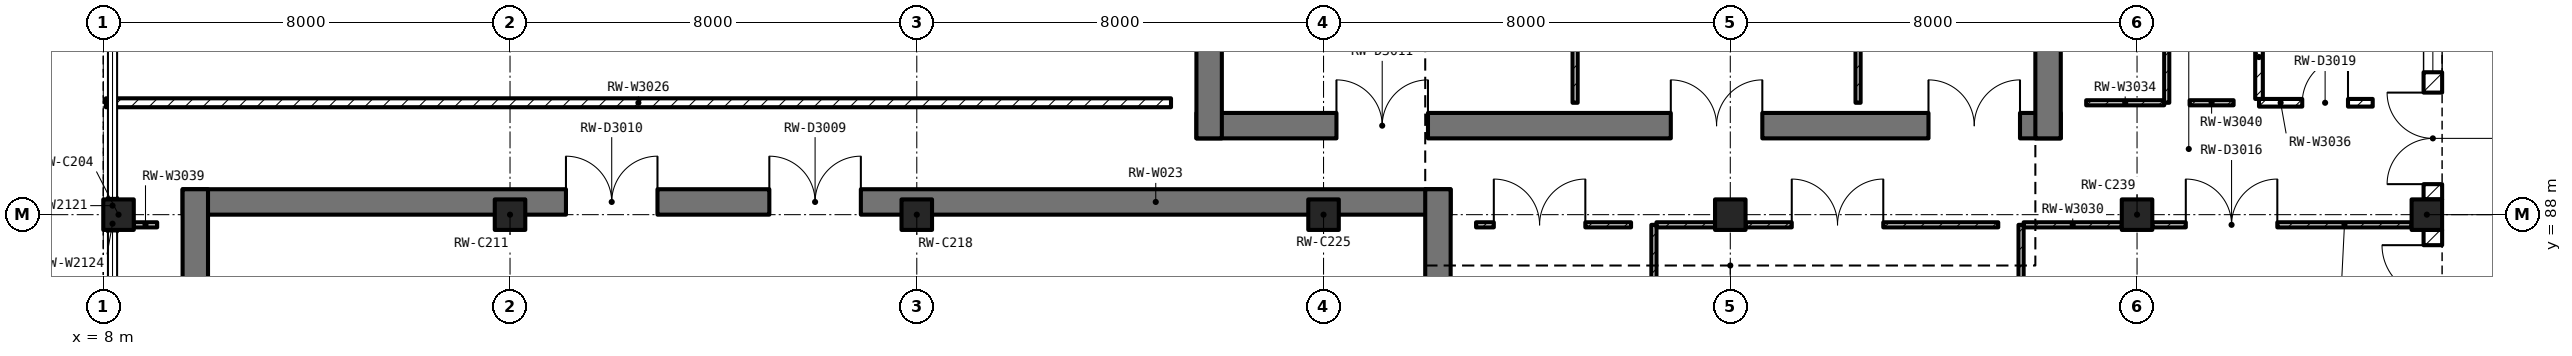
"""IFC4 building model, lengths in metres.
Left out: names, types, materials, properties, quantities, classifications, styles, units other than length and angle.
Written with IfcOpenShell. Run it as: python <this file> out.ifc"""

import sys

from ifc_helpers import new_model, si_unit, direction, frame, frame_2d, origin, origin_2d, place, context, subcontext, project, spatial, rectangle, extrude, element, fill, save


model = new_model("IFC4")
c1 = context("Model", 3, precision=1e-05, world=origin(), true_north=direction((0.0, 1.0)))
c2 = subcontext(c1, "Body", "Model", "MODEL_VIEW")
j1 = project(units=[si_unit("LENGTHUNIT", "METRE"), si_unit("PLANEANGLEUNIT", "RADIAN")], contexts=[c1])
p1 = place(None, origin())
s1 = spatial("IfcSite", under=j1, at=p1, CompositionType="ELEMENT")
p2 = place(p1, origin())
s2 = spatial("IfcBuilding", under=s1, at=p2, CompositionType="ELEMENT")
p3 = place(p2, origin())
s3 = spatial("IfcBuildingStorey", under=s2, at=p3, CompositionType="ELEMENT", Elevation=0.0)
for number, where, z_axis, x_axis in (
    (1, (8.3, 88.0, 0.0), (0.0, 0.0, 1.0), (1.0, 0.0, 0.0)),
    (2, (16.0, 88.0, 0.0), (0.0, 0.0, 1.0), (1.0, 0.0, 0.0)),
    (3, (24.0, 88.0, 0.0), (0.0, 0.0, 1.0), (1.0, 0.0, 0.0)),
    (4, (32.0, 88.0, 0.0), (0.0, 0.0, 1.0), (1.0, 0.0, 0.0)),
    (5, (40.0, 88.0, 0.0), (0.0, 0.0, 1.0), (1.0, 0.0, 0.0)),
    (6, (48.0, 88.0, 0.0), (0.0, 0.0, 1.0), (1.0, 0.0, 0.0)),
    (7, (53.7, 88.0, 0.0), (0.0, 0.0, 1.0), (1.0, 0.0, 0.0)),
):
    element("IfcColumn", number, at=place(p3, frame(where, z_axis=z_axis, x_axis=x_axis)), inside=s3, PredefinedType="COLUMN", context=c2, shape_type="SweptSolid", body=[
        extrude(rectangle(XDim=0.6, YDim=0.6, at=origin_2d()), origin(), (0.0, 0.0, 1.0), 6.0),
    ])
p4 = place(p3, frame((29.5, 89.75, 0.0), z_axis=(0.0, 0.0, 1.0), x_axis=(1.0, 0.0, 0.0)))
e8 = element("IfcWall", 8, at=p4, inside=s3, PredefinedType="SHEAR", context=c2, shape_type="SweptSolid", body=[
    extrude(rectangle(XDim=17.0, YDim=0.5, at=frame_2d((8.5, 0.0))), origin(), (0.0, 0.0, 1.0), 6.0),
])
p5 = place(p4, frame((2.754, 0.0, 0.0)))
e9 = element("IfcOpeningElement", 9, at=p5, cuts=e8, PredefinedType="OPENING", context=c2, shape_type="SweptSolid", body=[
    extrude(rectangle(XDim=1.8, YDim=2.1, at=frame_2d((0.9, 1.05))), frame((0.0, 0.262, 0.0), z_axis=(0.0, -1.0, 0.0), x_axis=(1.0, 0.0, 0.0)), (0.0, 0.0, 1.0), 0.524),
])
p6 = place(p4, frame((9.33, 0.0, 0.0)))
e10 = element("IfcOpeningElement", 10, at=p6, cuts=e8, PredefinedType="OPENING", context=c2, shape_type="SweptSolid", body=[
    extrude(rectangle(XDim=1.8, YDim=2.1, at=frame_2d((0.9, 1.05))), frame((0.0, 0.262, 0.0), z_axis=(0.0, -1.0, 0.0), x_axis=(1.0, 0.0, 0.0)), (0.0, 0.0, 1.0), 0.524),
])
p7 = place(p4, frame((14.398, 0.0, 0.0)))
e11 = element("IfcOpeningElement", 11, at=p7, cuts=e8, PredefinedType="OPENING", context=c2, shape_type="SweptSolid", body=[
    extrude(rectangle(XDim=1.8, YDim=2.1, at=frame_2d((0.9, 1.05))), frame((0.0, 0.262, 0.0), z_axis=(0.0, -1.0, 0.0), x_axis=(1.0, 0.0, 0.0)), (0.0, 0.0, 1.0), 0.524),
])
for number, where, z_axis, x_axis in (
    (12, (29.75, 89.5, 0.0), (0.0, 0.0, 1.0), (0.0, 1.0, 0.0)),
    (13, (46.25, 89.5, 0.0), (0.0, 0.0, 1.0), (0.0, 1.0, 0.0)),
):
    element("IfcWall", number, at=place(p3, frame(where, z_axis=z_axis, x_axis=x_axis)), inside=s3, PredefinedType="SHEAR", context=c2, shape_type="SweptSolid", body=[
        extrude(rectangle(XDim=21.0, YDim=0.5, at=frame_2d((10.5, 0.0))), origin(), (0.0, 0.0, 1.0), 6.0),
    ])
p8 = place(p3, frame((9.56, 88.25, 0.0), z_axis=(0.0, 0.0, 1.0), x_axis=(1.0, 0.0, 0.0)))
e14 = element("IfcWall", 14, at=p8, inside=s3, PredefinedType="SHEAR", context=c2, shape_type="SweptSolid", body=[
    extrude(rectangle(XDim=24.94, YDim=0.5, at=frame_2d((12.47, 0.0))), origin(), (0.0, 0.0, 1.0), 6.0),
])
p9 = place(p8, frame((11.54, 0.0, 0.0)))
e15 = element("IfcOpeningElement", 15, at=p9, cuts=e14, PredefinedType="OPENING", context=c2, shape_type="SweptSolid", body=[
    extrude(rectangle(XDim=1.8, YDim=2.1, at=frame_2d((0.9, 1.05))), frame((0.0, 0.262, 0.0), z_axis=(0.0, -1.0, 0.0), x_axis=(1.0, 0.0, 0.0)), (0.0, 0.0, 1.0), 0.524),
])
p10 = place(p8, frame((7.54, 0.0, 0.0)))
e16 = element("IfcOpeningElement", 16, at=p10, cuts=e14, PredefinedType="OPENING", context=c2, shape_type="SweptSolid", body=[
    extrude(rectangle(XDim=1.8, YDim=2.1, at=frame_2d((0.9, 1.05))), frame((0.0, 0.262, 0.0), z_axis=(0.0, -1.0, 0.0), x_axis=(1.0, 0.0, 0.0)), (0.0, 0.0, 1.0), 0.524),
])
for number, where, z_axis, x_axis in (
    (17, (9.81, 65.5, 0.0), (0.0, 0.0, 1.0), (0.0, 1.0, 0.0)),
    (18, (34.25, 65.5, 0.0), (0.0, 0.0, 1.0), (0.0, 1.0, 0.0)),
):
    element("IfcWall", number, at=place(p3, frame(where, z_axis=z_axis, x_axis=x_axis)), inside=s3, PredefinedType="SHEAR", context=c2, shape_type="SweptSolid", body=[
        extrude(rectangle(XDim=23.0, YDim=0.5, at=frame_2d((11.5, 0.0))), origin(), (0.0, 0.0, 1.0), 6.0),
    ])
p11 = place(p3, frame((53.818, 80.243, 0.0), z_axis=(0.0, 0.0, 1.0), x_axis=(0.0, 1.0, 0.0)))
e19 = element("IfcWall", 19, at=p11, inside=s3, PredefinedType="SOLIDWALL", context=c2, shape_type="SweptSolid", body=[
    extrude(rectangle(XDim=7.457, YDim=0.365, at=frame_2d((3.729, 0.0))), origin(), (0.0, 0.0, 1.0), 5.05),
])
p12 = place(p11, frame((5.157, 0.0, 0.0)))
e20 = element("IfcOpeningElement", 20, at=p12, cuts=e19, PredefinedType="OPENING", context=c2, shape_type="SweptSolid", body=[
    extrude(rectangle(XDim=2.0, YDim=2.4, at=frame_2d((1.0, 1.2))), frame((0.0, 0.195, 0.0), z_axis=(0.0, -1.0, 0.0), x_axis=(1.0, 0.0, 0.0)), (0.0, 0.0, 1.0), 0.389),
])
p13 = place(p11, frame((1.357, 0.0, 0.0)))
e21 = element("IfcOpeningElement", 21, at=p13, cuts=e19, PredefinedType="OPENING", context=c2, shape_type="SweptSolid", body=[
    extrude(rectangle(XDim=1.8, YDim=2.4, at=frame_2d((0.9, 1.2))), frame((0.0, 0.195, 0.0), z_axis=(0.0, -1.0, 0.0), x_axis=(1.0, 0.0, 0.0)), (0.0, 0.0, 1.0), 0.389),
])
p14 = place(p3, frame((53.818, 88.3, 0.0), z_axis=(0.0, 0.0, 1.0), x_axis=(0.0, 1.0, 0.0)))
e22 = element("IfcWall", 22, at=p14, inside=s3, PredefinedType="SOLIDWALL", context=c2, shape_type="SweptSolid", body=[
    extrude(rectangle(XDim=7.4, YDim=0.365, at=frame_2d((3.7, 0.0))), origin(), (0.0, 0.0, 1.0), 5.05),
])
p15 = place(p14, frame((2.5, 0.0, 1.0)))
e23 = element("IfcOpeningElement", 23, at=p15, cuts=e22, PredefinedType="OPENING", context=c2, shape_type="SweptSolid", body=[
    extrude(rectangle(XDim=2.4, YDim=2.0, at=frame_2d((1.2, 1.0))), frame((0.0, 0.195, 0.0), z_axis=(0.0, -1.0, 0.0), x_axis=(1.0, 0.0, 0.0)), (0.0, 0.0, 1.0), 0.389),
])
p16 = place(p14, frame((0.3, 0.0, 0.0)))
e24 = element("IfcOpeningElement", 24, at=p16, cuts=e22, PredefinedType="OPENING", context=c2, shape_type="SweptSolid", body=[
    extrude(rectangle(XDim=1.8, YDim=2.4, at=frame_2d((0.9, 1.2))), frame((0.0, 0.195, 0.0), z_axis=(0.0, -1.0, 0.0), x_axis=(1.0, 0.0, 0.0)), (0.0, 0.0, 1.0), 0.389),
])
p17 = place(p3, frame((38.498, 87.8, 0.0), z_axis=(0.0, 0.0, 1.0), x_axis=(0.0, -1.0, 0.0)))
e25 = element("IfcWall", 25, at=p17, inside=s3, PredefinedType="PARTITIONING", context=c2, shape_type="SweptSolid", body=[
    extrude(rectangle(XDim=23.75, YDim=0.1, at=frame_2d((11.875, 0.0))), origin(), (0.0, 0.0, 1.0), 4.95),
])
for number, where, z_axis, x_axis in (
    (26, (36.948, 109.999, 0.0), (0.0, 0.0, 1.0), (0.0, -1.0, 0.0)),
    (27, (42.513, 109.999, 0.0), (0.0, 0.0, 1.0), (0.0, -1.0, 0.0)),
):
    element("IfcWall", number, at=place(p3, frame(where, z_axis=z_axis, x_axis=x_axis)), inside=s3, PredefinedType="PARTITIONING", context=c2, shape_type="SweptSolid", body=[
        extrude(rectangle(XDim=19.799, YDim=0.1, at=frame_2d((9.899, 0.0))), origin(), (0.0, 0.0, 1.0), 4.95),
    ])
p18 = place(p3, frame((48.584, 111.634, 0.0), z_axis=(0.0, 0.0, 1.0), x_axis=(0.0, -1.0, 0.0)))
e28 = element("IfcWall", 28, at=p18, inside=s3, PredefinedType="PARTITIONING", context=c2, shape_type="SweptSolid", body=[
    extrude(rectangle(XDim=21.434, YDim=0.1, at=frame_2d((10.717, 0.0))), origin(), (0.0, 0.0, 1.0), 4.95),
])
p19 = place(p18, frame((10.034, 0.0, 0.0)))
e29 = element("IfcOpeningElement", 29, at=p19, cuts=e28, PredefinedType="OPENING", context=c2, shape_type="SweptSolid", body=[
    extrude(rectangle(XDim=1.0, YDim=2.1, at=frame_2d((0.5, 1.05))), frame((0.0, 0.062, 0.0), z_axis=(0.0, -1.0, 0.0), x_axis=(1.0, 0.0, 0.0)), (0.0, 0.0, 1.0), 0.124),
])
p20 = place(p3, frame((29.0, 90.2, 0.0), z_axis=(0.0, 0.0, 1.0), x_axis=(-1.0, 0.0, 0.0)))
e30 = element("IfcWall", 30, at=p20, inside=s3, PredefinedType="PARTITIONING", context=c2, shape_type="SweptSolid", body=[
    extrude(rectangle(XDim=20.95, YDim=0.175, at=frame_2d((10.475, 0.0))), origin(), (0.0, 0.0, 1.0), 4.95),
])
p21 = place(p3, frame((45.719, 87.8, 0.0), z_axis=(0.0, 0.0, 1.0), x_axis=(0.0, -1.0, 0.0)))
e31 = element("IfcWall", 31, at=p21, inside=s3, PredefinedType="PARTITIONING", context=c2, shape_type="SweptSolid", body=[
    extrude(rectangle(XDim=9.399, YDim=0.1, at=frame_2d((4.7, 0.0))), origin(), (0.0, 0.0, 1.0), 4.95),
])
p22 = place(p3, frame((45.77, 87.8, 0.0), z_axis=(0.0, 0.0, 1.0), x_axis=(1.0, 0.0, 0.0)))
e32 = element("IfcWall", 32, at=p22, inside=s3, PredefinedType="PARTITIONING", context=c2, shape_type="SweptSolid", body=[
    extrude(rectangle(XDim=1.93, YDim=0.1, at=frame_2d((0.965, 0.0))), origin(), (0.0, 0.0, 1.0), 4.95),
])
p23 = place(p3, frame((48.3, 87.8, 0.0), z_axis=(0.0, 0.0, 1.0), x_axis=(1.0, 0.0, 0.0)))
e33 = element("IfcWall", 33, at=p23, inside=s3, PredefinedType="PARTITIONING", context=c2, shape_type="SweptSolid", body=[
    extrude(rectangle(XDim=5.1, YDim=0.1, at=frame_2d((2.55, 0.0))), origin(), (0.0, 0.0, 1.0), 4.95),
])
p24 = place(p23, frame((0.659, 0.0, 0.0)))
e34 = element("IfcOpeningElement", 34, at=p24, cuts=e33, PredefinedType="OPENING", context=c2, shape_type="SweptSolid", body=[
    extrude(rectangle(XDim=1.8, YDim=2.1, at=frame_2d((0.9, 1.05))), frame((0.0, 0.062, 0.0), z_axis=(0.0, -1.0, 0.0), x_axis=(1.0, 0.0, 0.0)), (0.0, 0.0, 1.0), 0.124),
])
p25 = place(p3, frame((38.548, 87.8, 0.0), z_axis=(0.0, 0.0, 1.0), x_axis=(1.0, 0.0, 0.0)))
e35 = element("IfcWall", 35, at=p25, inside=s3, PredefinedType="PARTITIONING", context=c2, shape_type="SweptSolid", body=[
    extrude(rectangle(XDim=1.152, YDim=0.1, at=frame_2d((0.576, 0.0))), origin(), (0.0, 0.0, 1.0), 4.95),
])
p26 = place(p3, frame((40.3, 87.8, 0.0), z_axis=(0.0, 0.0, 1.0), x_axis=(1.0, 0.0, 0.0)))
e36 = element("IfcWall", 36, at=p26, inside=s3, PredefinedType="PARTITIONING", context=c2, shape_type="SweptSolid", body=[
    extrude(rectangle(XDim=4.97, YDim=0.1, at=frame_2d((2.485, 0.0))), origin(), (0.0, 0.0, 1.0), 4.95),
])
p27 = place(p26, frame((0.909, 0.0, 0.0)))
e37 = element("IfcOpeningElement", 37, at=p27, cuts=e36, PredefinedType="OPENING", context=c2, shape_type="SweptSolid", body=[
    extrude(rectangle(XDim=1.8, YDim=2.1, at=frame_2d((0.9, 1.05))), frame((0.0, 0.062, 0.0), z_axis=(0.0, -1.0, 0.0), x_axis=(1.0, 0.0, 0.0)), (0.0, 0.0, 1.0), 0.124),
])
p28 = place(p3, frame((48.534, 90.2, 0.0), z_axis=(0.0, 0.0, 1.0), x_axis=(-1.0, 0.0, 0.0)))
e38 = element("IfcWall", 38, at=p28, inside=s3, PredefinedType="PARTITIONING", context=c2, shape_type="SweptSolid", body=[
    extrude(rectangle(XDim=1.534, YDim=0.1, at=frame_2d((0.767, 0.0))), origin(), (0.0, 0.0, 1.0), 4.95),
])
p29 = place(p3, frame((35.0, 87.8, 0.0), z_axis=(0.0, 0.0, 1.0), x_axis=(1.0, 0.0, 0.0)))
e39 = element("IfcWall", 39, at=p29, inside=s3, PredefinedType="PARTITIONING", context=c2, shape_type="SweptSolid", body=[
    extrude(rectangle(XDim=3.048, YDim=0.1, at=frame_2d((1.524, 0.0))), origin(), (0.0, 0.0, 1.0), 4.95),
])
p30 = place(p29, frame((0.349, 0.0, 0.0)))
e40 = element("IfcOpeningElement", 40, at=p30, cuts=e39, PredefinedType="OPENING", context=c2, shape_type="SweptSolid", body=[
    extrude(rectangle(XDim=1.8, YDim=2.1, at=frame_2d((0.9, 1.05))), frame((0.0, 0.062, 0.0), z_axis=(0.0, -1.0, 0.0), x_axis=(1.0, 0.0, 0.0)), (0.0, 0.0, 1.0), 0.124),
])
p31 = place(p3, frame((50.399, 90.2, 0.0), z_axis=(0.0, 0.0, 1.0), x_axis=(1.0, 0.0, 0.0)))
e41 = element("IfcWall", 41, at=p31, inside=s3, PredefinedType="PARTITIONING", context=c2, shape_type="SweptSolid", body=[
    extrude(rectangle(XDim=2.236, YDim=0.15, at=frame_2d((1.118, 0.0))), origin(), (0.0, 0.0, 1.0), 4.95),
])
p32 = place(p31, frame((0.85, 0.0, 0.0)))
e42 = element("IfcOpeningElement", 42, at=p32, cuts=e41, PredefinedType="OPENING", context=c2, shape_type="SweptSolid", body=[
    extrude(rectangle(XDim=0.9, YDim=2.1, at=frame_2d((0.45, 1.05))), frame((0.0, 0.087, 0.0), z_axis=(0.0, -1.0, 0.0), x_axis=(1.0, 0.0, 0.0)), (0.0, 0.0, 1.0), 0.174),
])
p33 = place(p3, frame((50.399, 90.276, 0.0), z_axis=(0.0, 0.0, 1.0), x_axis=(0.0, 1.0, 0.0)))
e43 = element("IfcWall", 43, at=p33, inside=s3, PredefinedType="PARTITIONING", context=c2, shape_type="SweptSolid", body=[
    extrude(rectangle(XDim=1.646, YDim=0.15, at=frame_2d((0.823, 0.0))), origin(), (0.0, 0.0, 1.0), 4.95),
])
p34 = place(p3, frame((8.601, 87.8, 0.0), z_axis=(0.0, 0.0, 1.0), x_axis=(1.0, 0.0, 0.0)))
e44 = element("IfcWall", 44, at=p34, inside=s3, PredefinedType="PARTITIONING", context=c2, shape_type="SweptSolid", body=[
    extrude(rectangle(XDim=0.459, YDim=0.1, at=frame_2d((0.229, 0.0))), origin(), (0.0, 0.0, 1.0), 4.95),
])
p35 = place(p3, frame((49.034, 90.2, 0.0), z_axis=(0.0, 0.0, 1.0), x_axis=(1.0, 0.0, 0.0)))
e45 = element("IfcWall", 45, at=p35, inside=s3, PredefinedType="PARTITIONING", context=c2, shape_type="SweptSolid", body=[
    extrude(rectangle(XDim=0.865, YDim=0.1, at=frame_2d((0.433, 0.0))), origin(), (0.0, 0.0, 1.0), 4.95),
])
for number, where, z_axis, x_axis in (
    (46, (8.182, 88.33, 0.0), (0.0, 0.0, 1.0), (0.0, -1.0, 0.0)),
    (47, (8.182, 87.67, 0.0), (0.0, 0.0, 1.0), (0.0, 1.0, 0.0)),
):
    element("IfcWall", number, at=place(p3, frame(where, z_axis=z_axis, x_axis=x_axis)), inside=s3, PredefinedType="SOLIDWALL", context=c2, shape_type="SweptSolid", body=[
        extrude(rectangle(XDim=0.305, YDim=0.18, at=frame_2d((0.153, 0.0))), origin(), (0.0, 0.0, 1.0), 4.2),
    ])
p36 = place(p15, origin())
e48 = element("IfcWindow", 48, at=p36, inside=s3, PartitioningType="DOUBLE_PANEL_VERTICAL", PredefinedType="WINDOW", context=c2, shape_type="SweptSolid", body=[
    extrude(rectangle(XDim=2.4, YDim=2.0, at=frame_2d((1.2, 1.0))), frame((0.0, 0.03, 0.0), z_axis=(0.0, -1.0, 0.0), x_axis=(1.0, 0.0, 0.0)), (0.0, 0.0, 1.0), 0.06),
])
fill(e23, e48)
p37 = place(p12, origin())
e49 = element("IfcDoor", 49, at=p37, inside=s3, OperationType="DOUBLE_DOOR_DOUBLE_SWING", PredefinedType="DOOR", context=c2, shape_type="SweptSolid", body=[
    extrude(rectangle(XDim=2.0, YDim=2.4, at=frame_2d((1.0, 1.2))), frame((0.0, 0.025, 0.0), z_axis=(0.0, -1.0, 0.0), x_axis=(1.0, 0.0, 0.0)), (0.0, 0.0, 1.0), 0.05),
])
fill(e20, e49)
p38 = place(p16, origin())
e50 = element("IfcDoor", 50, at=p38, inside=s3, OperationType="DOUBLE_DOOR_DOUBLE_SWING", PredefinedType="DOOR", context=c2, shape_type="SweptSolid", body=[
    extrude(rectangle(XDim=1.8, YDim=2.4, at=frame_2d((0.9, 1.2))), frame((0.0, 0.025, 0.0), z_axis=(0.0, -1.0, 0.0), x_axis=(1.0, 0.0, 0.0)), (0.0, 0.0, 1.0), 0.05),
])
fill(e24, e50)
p39 = place(p9, origin())
e51 = element("IfcDoor", 51, at=p39, inside=s3, OperationType="DOUBLE_DOOR_SINGLE_SWING", PredefinedType="DOOR", context=c2, shape_type="SweptSolid", body=[
    extrude(rectangle(XDim=1.8, YDim=2.1, at=frame_2d((0.9, 1.05))), frame((0.0, 0.025, 0.0), z_axis=(0.0, -1.0, 0.0), x_axis=(1.0, 0.0, 0.0)), (0.0, 0.0, 1.0), 0.05),
])
fill(e15, e51)
p40 = place(p10, origin())
e52 = element("IfcDoor", 52, at=p40, inside=s3, OperationType="DOUBLE_DOOR_SINGLE_SWING", PredefinedType="DOOR", context=c2, shape_type="SweptSolid", body=[
    extrude(rectangle(XDim=1.8, YDim=2.1, at=frame_2d((0.9, 1.05))), frame((0.0, 0.025, 0.0), z_axis=(0.0, -1.0, 0.0), x_axis=(1.0, 0.0, 0.0)), (0.0, 0.0, 1.0), 0.05),
])
fill(e16, e52)
p41 = place(p5, origin())
e53 = element("IfcDoor", 53, at=p41, inside=s3, OperationType="DOUBLE_DOOR_SINGLE_SWING", PredefinedType="DOOR", context=c2, shape_type="SweptSolid", body=[
    extrude(rectangle(XDim=1.8, YDim=2.1, at=frame_2d((0.9, 1.05))), frame((0.0, 0.025, 0.0), z_axis=(0.0, -1.0, 0.0), x_axis=(1.0, 0.0, 0.0)), (0.0, 0.0, 1.0), 0.05),
])
fill(e9, e53)
p42 = place(p30, origin())
e54 = element("IfcDoor", 54, at=p42, inside=s3, OperationType="DOUBLE_DOOR_SINGLE_SWING", PredefinedType="DOOR", context=c2, shape_type="SweptSolid", body=[
    extrude(rectangle(XDim=1.8, YDim=2.1, at=frame_2d((0.9, 1.05))), frame((0.0, 0.025, 0.0), z_axis=(0.0, -1.0, 0.0), x_axis=(1.0, 0.0, 0.0)), (0.0, 0.0, 1.0), 0.05),
])
fill(e40, e54)
p43 = place(p6, origin())
e55 = element("IfcDoor", 55, at=p43, inside=s3, OperationType="DOUBLE_DOOR_SINGLE_SWING", PredefinedType="DOOR", context=c2, shape_type="SweptSolid", body=[
    extrude(rectangle(XDim=1.8, YDim=2.1, at=frame_2d((0.9, 1.05))), frame((0.0, 0.025, 0.0), z_axis=(0.0, -1.0, 0.0), x_axis=(1.0, 0.0, 0.0)), (0.0, 0.0, 1.0), 0.05),
])
fill(e10, e55)
p44 = place(p27, origin())
e56 = element("IfcDoor", 56, at=p44, inside=s3, OperationType="DOUBLE_DOOR_SINGLE_SWING", PredefinedType="DOOR", context=c2, shape_type="SweptSolid", body=[
    extrude(rectangle(XDim=1.8, YDim=2.1, at=frame_2d((0.9, 1.05))), frame((0.0, 0.025, 0.0), z_axis=(0.0, -1.0, 0.0), x_axis=(1.0, 0.0, 0.0)), (0.0, 0.0, 1.0), 0.05),
])
fill(e37, e56)
p45 = place(p7, origin())
e57 = element("IfcDoor", 57, at=p45, inside=s3, OperationType="DOUBLE_DOOR_SINGLE_SWING", PredefinedType="DOOR", context=c2, shape_type="SweptSolid", body=[
    extrude(rectangle(XDim=1.8, YDim=2.1, at=frame_2d((0.9, 1.05))), frame((0.0, 0.025, 0.0), z_axis=(0.0, -1.0, 0.0), x_axis=(1.0, 0.0, 0.0)), (0.0, 0.0, 1.0), 0.05),
])
fill(e11, e57)
p46 = place(p24, origin())
e58 = element("IfcDoor", 58, at=p46, inside=s3, OperationType="DOUBLE_DOOR_SINGLE_SWING", PredefinedType="DOOR", context=c2, shape_type="SweptSolid", body=[
    extrude(rectangle(XDim=1.8, YDim=2.1, at=frame_2d((0.9, 1.05))), frame((0.0, 0.025, 0.0), z_axis=(0.0, -1.0, 0.0), x_axis=(1.0, 0.0, 0.0)), (0.0, 0.0, 1.0), 0.05),
])
fill(e34, e58)
p47 = place(p32, origin())
e59 = element("IfcDoor", 59, at=p47, inside=s3, OperationType="SINGLE_SWING_RIGHT", PredefinedType="DOOR", context=c2, shape_type="SweptSolid", body=[
    extrude(rectangle(XDim=0.9, YDim=2.1, at=frame_2d((0.45, 1.05))), frame((0.0, 0.025, 0.0), z_axis=(0.0, -1.0, 0.0), x_axis=(1.0, 0.0, 0.0)), (0.0, 0.0, 1.0), 0.05),
])
fill(e42, e59)
save(model, sys.argv[1])
